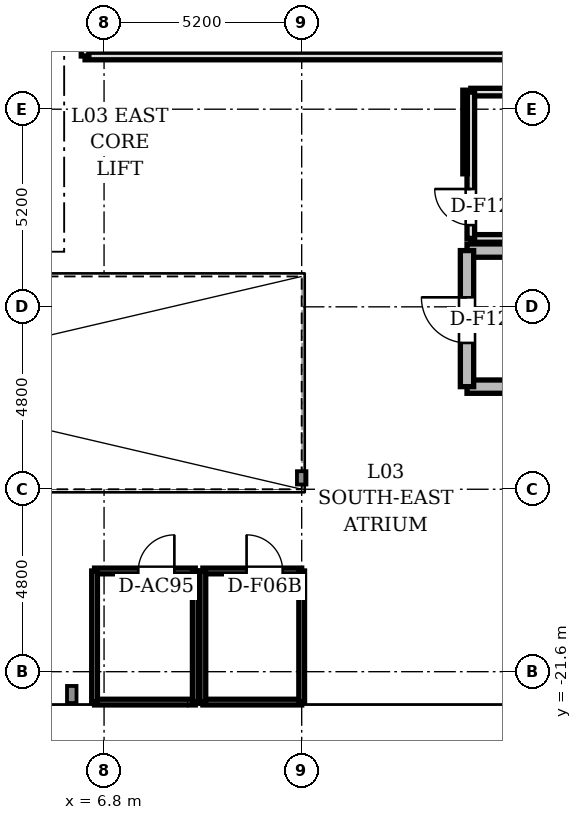
"""IFC4 building model, lengths in metres.
Left out: names, types, materials, properties, quantities, classifications, styles, units other than length and angle.
Written with IfcOpenShell. Run it as: python <this file> out.ifc"""

import sys

from ifc_helpers import new_model, si_unit, direction, frame, frame_2d, origin, origin_2d, place, context, subcontext, project, spatial, rectangle, i_section, extrude, source, transform, mapped, element, fill, save


model = new_model("IFC4")
c1 = context("Model", 3, precision=1e-05, world=origin(), true_north=direction((0.0, 1.0)))
c2 = subcontext(c1, "Body", "Model", "MODEL_VIEW")
j1 = project(units=[si_unit("LENGTHUNIT", "METRE"), si_unit("PLANEANGLEUNIT", "RADIAN")], contexts=[c1])
p1 = place(None, origin())
s1 = spatial("IfcSite", under=j1, at=p1, CompositionType="ELEMENT")
p2 = place(p1, origin())
s2 = spatial("IfcBuilding", under=s1, at=p2, CompositionType="ELEMENT")
p3 = place(p2, frame((0.0, 0.0, 14.1)))
s3 = spatial("IfcBuildingStorey", under=s2, at=p3, CompositionType="ELEMENT", Elevation=14.1)
m1 = source(origin(), c2, "Body", "SweptSolid", [
    extrude(i_section(OverallWidth=0.25, OverallDepth=0.45, WebThickness=0.014, FlangeThickness=0.014, FilletRadius=0.015, at=origin_2d()), origin(), (0.0, 0.0, 1.0), 4.18),
])
p4 = place(p3, frame((5.95, -22.2, 0.0), z_axis=(0.0, 0.0, 1.0), x_axis=(1.0, 0.0, 0.0)))
e1 = element("IfcColumn", 1, at=p4, inside=s3, PredefinedType="COLUMN", context=c2, shape_type="MappedRepresentation", body=[
    mapped(m1, transform((0.0, 0.0, 0.0), scale=1.0)),
])
m2 = source(origin(), c2, "Body", "SweptSolid", [
    extrude(i_section(OverallWidth=0.25, OverallDepth=0.35, WebThickness=0.012, FlangeThickness=0.012, FilletRadius=0.012, at=origin_2d()), origin(), (0.0, 0.0, 1.0), 4.18),
])
p5 = place(p3, frame((12.0, -16.5, 0.0), z_axis=(0.0, 0.0, 1.0), x_axis=(1.0, 0.0, 0.0)))
e2 = element("IfcColumn", 2, at=p5, inside=s3, PredefinedType="COLUMN", context=c2, shape_type="MappedRepresentation", body=[
    mapped(m2, transform((0.0, 0.0, 0.0), scale=1.0)),
])
for number, where, z_axis, x_axis in (
    (3, (16.35, -10.52, 0.0), (0.0, 0.0, 1.0), (1.0, 0.0, 0.0)),
    (4, (16.35, -14.1, 0.0), (0.0, 0.0, 1.0), (1.0, 0.0, 0.0)),
):
    element("IfcWall", number, at=place(p3, frame(where, z_axis=z_axis, x_axis=x_axis)), inside=s3, PredefinedType="SHEAR", context=c2, shape_type="SweptSolid", body=[
        extrude(rectangle(XDim=10.25, YDim=0.35, at=frame_2d((5.125, 0.0))), origin(), (0.0, 0.0, 1.0), 4.18),
    ])
p6 = place(p3, frame((16.35, -14.1, 0.0), z_axis=(0.0, 0.0, 1.0), x_axis=(0.0, 1.0, 0.0)))
e5 = element("IfcWall", 5, at=p6, inside=s3, PredefinedType="SHEAR", context=c2, shape_type="SweptSolid", body=[
    extrude(rectangle(XDim=3.58, YDim=0.35, at=frame_2d((1.79, 0.0))), origin(), (0.0, 0.0, 1.0), 4.18),
])
p7 = place(p6, frame((1.15, 0.0, 0.0)))
e6 = element("IfcOpeningElement", 6, at=p7, cuts=e5, PredefinedType="OPENING", context=c2, shape_type="SweptSolid", body=[
    extrude(rectangle(XDim=1.2, YDim=2.2, at=frame_2d((0.6, 1.1))), frame((0.0, 0.185, 0.0), z_axis=(0.0, -1.0, 0.0), x_axis=(1.0, 0.0, 0.0)), (0.0, 0.0, 1.0), 0.37),
])
p8 = place(p3, frame((6.3, -5.4, 0.0), z_axis=(0.0, 0.0, 1.0), x_axis=(1.0, 0.0, 0.0)))
e7 = element("IfcWall", 7, at=p8, inside=s3, PredefinedType="SOLIDWALL", context=c2, shape_type="SweptSolid", body=[
    extrude(rectangle(XDim=18.9, YDim=0.2, at=frame_2d((9.45, 0.0))), origin(), (0.0, 0.0, 1.0), 3.25),
])
p9 = place(p3, frame((6.3, -5.4, 0.0), z_axis=(0.0, 0.0, 1.0), x_axis=(0.0, 1.0, 0.0)))
e8 = element("IfcWall", 8, at=p9, inside=s3, PredefinedType="SOLIDWALL", context=c2, shape_type="SweptSolid", body=[
    extrude(rectangle(XDim=3.3, YDim=0.2, at=frame_2d((1.65, 0.0))), origin(), (0.0, 0.0, 1.0), 3.73),
])
p10 = place(p3, frame((16.45, -6.35, 0.0), z_axis=(0.0, 0.0, 1.0), x_axis=(1.0, 0.0, 0.0)))
e9 = element("IfcWall", 9, at=p10, inside=s3, PredefinedType="SOLIDWALL", context=c2, shape_type="SweptSolid", body=[
    extrude(rectangle(XDim=8.55, YDim=0.2, at=frame_2d((4.275, 0.0))), origin(), (0.0, 0.0, 1.0), 3.25),
])
p11 = place(p3, frame((16.45, -10.2, 0.0), z_axis=(0.0, 0.0, 1.0), x_axis=(1.0, 0.0, 0.0)))
e10 = element("IfcWall", 10, at=p11, inside=s3, PredefinedType="SOLIDWALL", context=c2, shape_type="SweptSolid", body=[
    extrude(rectangle(XDim=8.55, YDim=0.2, at=frame_2d((4.275, 0.0))), origin(), (0.0, 0.0, 1.0), 3.73),
])
p12 = place(p3, frame((16.45, -10.2, 0.0), z_axis=(0.0, 0.0, 1.0), x_axis=(0.0, 1.0, 0.0)))
e11 = element("IfcWall", 11, at=p12, inside=s3, PredefinedType="SOLIDWALL", context=c2, shape_type="SweptSolid", body=[
    extrude(rectangle(XDim=3.85, YDim=0.2, at=frame_2d((1.925, 0.0))), origin(), (0.0, 0.0, 1.0), 3.73),
])
p13 = place(p12, frame((0.35, 0.0, 0.0)))
e12 = element("IfcOpeningElement", 12, at=p13, cuts=e11, PredefinedType="OPENING", context=c2, shape_type="SweptSolid", body=[
    extrude(rectangle(XDim=0.95, YDim=2.15, at=frame_2d((0.475, 1.075))), frame((0.0, 0.11, 0.0), z_axis=(0.0, -1.0, 0.0), x_axis=(1.0, 0.0, 0.0)), (0.0, 0.0, 1.0), 0.22),
])
p14 = place(p3, frame((6.55, -18.95, 0.0), z_axis=(0.0, 0.0, 1.0), x_axis=(1.0, 0.0, 0.0)))
e13 = element("IfcWall", 13, at=p14, inside=s3, PredefinedType="PARTITIONING", context=c2, shape_type="SweptSolid", body=[
    extrude(rectangle(XDim=2.65, YDim=0.15, at=frame_2d((1.325, 0.0))), origin(), (0.0, 0.0, 1.0), 3.73),
])
p15 = place(p14, frame((1.15, 0.0, 0.0)))
e14 = element("IfcOpeningElement", 14, at=p15, cuts=e13, PredefinedType="OPENING", context=c2, shape_type="SweptSolid", body=[
    extrude(rectangle(XDim=0.95, YDim=2.15, at=frame_2d((0.475, 1.075))), frame((0.0, 0.085, 0.0), z_axis=(0.0, -1.0, 0.0), x_axis=(1.0, 0.0, 0.0)), (0.0, 0.0, 1.0), 0.17),
])
p16 = place(p3, frame((6.55, -22.4, 0.0), z_axis=(0.0, 0.0, 1.0), x_axis=(1.0, 0.0, 0.0)))
e15 = element("IfcWall", 15, at=p16, inside=s3, PredefinedType="PARTITIONING", context=c2, shape_type="SweptSolid", body=[
    extrude(rectangle(XDim=2.65, YDim=0.15, at=frame_2d((1.325, 0.0))), origin(), (0.0, 0.0, 1.0), 3.73),
])
for number, where, z_axis, x_axis in (
    (16, (6.55, -22.4, 0.0), (0.0, 0.0, 1.0), (0.0, 1.0, 0.0)),
    (17, (9.2, -22.4, 0.0), (0.0, 0.0, 1.0), (0.0, 1.0, 0.0)),
):
    element("IfcWall", number, at=place(p3, frame(where, z_axis=z_axis, x_axis=x_axis)), inside=s3, PredefinedType="PARTITIONING", context=c2, shape_type="SweptSolid", body=[
        extrude(rectangle(XDim=3.45, YDim=0.15, at=frame_2d((1.725, 0.0))), origin(), (0.0, 0.0, 1.0), 3.73),
    ])
p17 = place(p3, frame((9.4, -18.95, 0.0), z_axis=(0.0, 0.0, 1.0), x_axis=(1.0, 0.0, 0.0)))
e18 = element("IfcWall", 18, at=p17, inside=s3, PredefinedType="PARTITIONING", context=c2, shape_type="SweptSolid", body=[
    extrude(rectangle(XDim=2.6, YDim=0.15, at=frame_2d((1.3, 0.0))), origin(), (0.0, 0.0, 1.0), 3.73),
])
p18 = place(p17, frame((1.15, 0.0, 0.0)))
e19 = element("IfcOpeningElement", 19, at=p18, cuts=e18, PredefinedType="OPENING", context=c2, shape_type="SweptSolid", body=[
    extrude(rectangle(XDim=0.95, YDim=2.15, at=frame_2d((0.475, 1.075))), frame((0.0, 0.085, 0.0), z_axis=(0.0, -1.0, 0.0), x_axis=(1.0, 0.0, 0.0)), (0.0, 0.0, 1.0), 0.17),
])
p19 = place(p3, frame((9.4, -22.4, 0.0), z_axis=(0.0, 0.0, 1.0), x_axis=(1.0, 0.0, 0.0)))
e20 = element("IfcWall", 20, at=p19, inside=s3, PredefinedType="PARTITIONING", context=c2, shape_type="SweptSolid", body=[
    extrude(rectangle(XDim=2.6, YDim=0.15, at=frame_2d((1.3, 0.0))), origin(), (0.0, 0.0, 1.0), 3.73),
])
for number, where, z_axis, x_axis in (
    (21, (9.4, -22.4, 0.0), (0.0, 0.0, 1.0), (0.0, 1.0, 0.0)),
    (22, (12.0, -22.4, 0.0), (0.0, 0.0, 1.0), (0.0, 1.0, 0.0)),
):
    element("IfcWall", number, at=place(p3, frame(where, z_axis=z_axis, x_axis=x_axis)), inside=s3, PredefinedType="PARTITIONING", context=c2, shape_type="SweptSolid", body=[
        extrude(rectangle(XDim=3.45, YDim=0.15, at=frame_2d((1.725, 0.0))), origin(), (0.0, 0.0, 1.0), 3.73),
    ])
p20 = place(p3, frame((16.3, -8.5, 0.0), z_axis=(0.0, 0.0, 1.0), x_axis=(0.0, 1.0, 0.0)))
e23 = element("IfcWall", 23, at=p20, inside=s3, PredefinedType="MOVABLE", context=c2, shape_type="SweptSolid", body=[
    extrude(rectangle(XDim=2.2, YDim=0.12, at=frame_2d((1.1, 0.0))), origin(), (0.0, 0.0, 1.0), 3.73),
])
m3 = source(origin(), c2, "Body", "SweptSolid", [
    extrude(rectangle(XDim=1.2, YDim=0.05, at=origin_2d()), origin(), (0.0, 0.0, 1.0), 2.2),
])
p21 = place(p7, frame((0.6, 0.0, 0.0)))
e24 = element("IfcDoor", 24, at=p21, inside=s3, OperationType="SINGLE_SWING_RIGHT", PredefinedType="DOOR", context=c2, shape_type="MappedRepresentation", body=[
    mapped(m3, transform((0.0, 0.0, 0.0), scale=1.0)),
])
fill(e6, e24)
m4 = source(origin(), c2, "Body", "SweptSolid", [
    extrude(rectangle(XDim=0.95, YDim=0.05, at=origin_2d()), origin(), (0.0, 0.0, 1.0), 2.15),
])
p22 = place(p13, frame((0.475, 0.0, 0.0)))
e25 = element("IfcDoor", 25, at=p22, inside=s3, OperationType="SINGLE_SWING_RIGHT", PredefinedType="DOOR", context=c2, shape_type="MappedRepresentation", body=[
    mapped(m4, transform((0.0, 0.0, 0.0), scale=1.0)),
])
fill(e12, e25)
p23 = place(p15, frame((0.475, 0.0, 0.0)))
e26 = element("IfcDoor", 26, at=p23, inside=s3, OperationType="SINGLE_SWING_RIGHT", PredefinedType="DOOR", context=c2, shape_type="MappedRepresentation", body=[
    mapped(m4, transform((0.0, 0.0, 0.0), scale=1.0)),
])
fill(e14, e26)
p24 = place(p18, frame((0.475, 0.0, 0.0)))
e27 = element("IfcDoor", 27, at=p24, inside=s3, OperationType="SINGLE_SWING_LEFT", PredefinedType="DOOR", context=c2, shape_type="MappedRepresentation", body=[
    mapped(m4, transform((0.0, 0.0, 0.0), scale=1.0)),
])
fill(e19, e27)
save(model, sys.argv[1])
